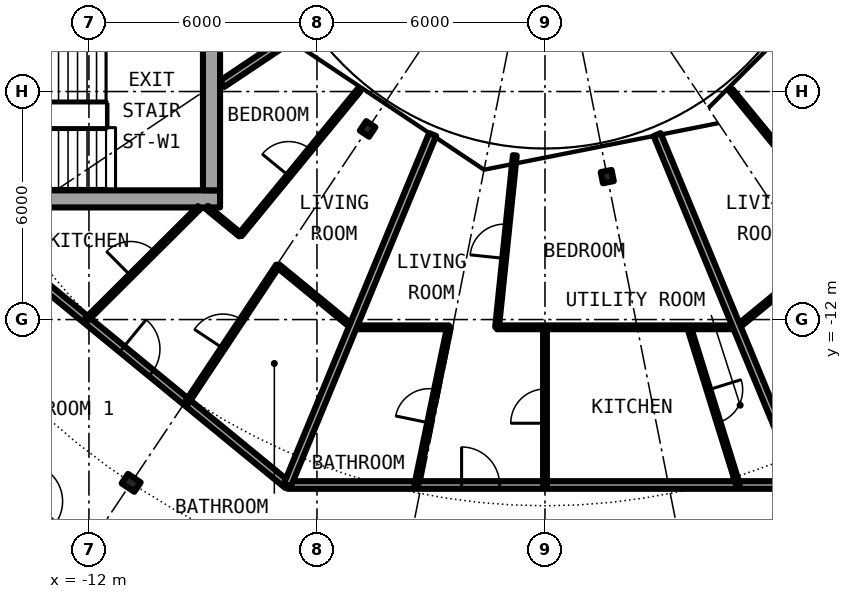
"""IFC4 building model, lengths in metres.
Left out: names, types, materials, properties, quantities, classifications, styles, units other than length and angle.
Written with IfcOpenShell. Run it as: python <this file> out.ifc"""

import sys

from ifc_helpers import new_model, si_unit, direction, frame, frame_2d, origin, origin_2d, place, context, subcontext, project, spatial, rectangle, i_section, extrude, element, fill, save


model = new_model("IFC4")
c1 = context("Model", 3, precision=1e-05, world=origin(), true_north=direction((0.0, 1.0)))
c2 = subcontext(c1, "Body", "Model", "MODEL_VIEW")
j1 = project(units=[si_unit("LENGTHUNIT", "METRE"), si_unit("PLANEANGLEUNIT", "RADIAN")], contexts=[c1])
p1 = place(None, origin())
s1 = spatial("IfcSite", under=j1, at=p1, CompositionType="ELEMENT")
p2 = place(p1, origin())
s2 = spatial("IfcBuilding", under=s1, at=p2, CompositionType="ELEMENT")
p3 = place(p2, frame((0.0, 0.0, 202.4)))
s3 = spatial("IfcBuildingStorey", under=s2, at=p3, CompositionType="ELEMENT", Elevation=202.4)
p4 = place(p3, frame((-10.889, -16.297, 0.0), z_axis=(0.0, 0.0, 1.0), x_axis=(-0.55557023302, -0.831469612303, 0.0)))
e1 = element("IfcColumn", 1, at=p4, inside=s3, PredefinedType="COLUMN", context=c2, shape_type="SweptSolid", body=[
    extrude(i_section(OverallWidth=0.3, OverallDepth=0.4, WebThickness=0.013, FlangeThickness=0.024, FilletRadius=0.027, at=origin_2d()), origin(), (0.0, 0.0, 1.0), 3.05),
])
for number, where, z_axis, x_axis in (
    (2, (-4.667, -6.984, 0.0), (0.0, 0.0, 1.0), (-0.556, -0.831, 0.0)),
    (3, (1.639, -8.239, 0.0), (0.0, 0.0, 1.0), (0.195, -0.981, 0.0)),
):
    element("IfcColumn", number, at=place(p3, frame(where, z_axis=z_axis, x_axis=x_axis)), inside=s3, PredefinedType="COLUMN", context=c2, shape_type="SweptSolid", body=[
        extrude(i_section(OverallWidth=0.3, OverallDepth=0.29, WebThickness=0.009, FlangeThickness=0.014, FilletRadius=0.027, at=origin_2d()), origin(), (0.0, 0.0, 1.0), 3.05),
    ])
p5 = place(p3, frame((-22.05, -8.825, 0.0), z_axis=(0.0, 0.0, 1.0), x_axis=(1.0, 0.0, 0.0)))
e4 = element("IfcWall", 4, at=p5, inside=s3, PredefinedType="SHEAR", context=c2, shape_type="SweptSolid", body=[
    extrude(rectangle(XDim=13.5, YDim=0.45, at=frame_2d((6.75, 0.0))), origin(), (0.0, 0.0, 1.0), 3.05),
])
p6 = place(p5, frame((0.975, 0.0, 0.0)))
e5 = element("IfcOpeningElement", 5, at=p6, cuts=e4, PredefinedType="OPENING", context=c2, shape_type="SweptSolid", body=[
    extrude(rectangle(XDim=1.2, YDim=2.3, at=frame_2d((0.6, 1.15))), frame((0.0, 0.235, 0.0), z_axis=(0.0, -1.0, 0.0), x_axis=(1.0, 0.0, 0.0)), (0.0, 0.0, 1.0), 0.47),
])
p7 = place(p3, frame((-8.775, 8.6, 0.0), z_axis=(0.0, 0.0, 1.0), x_axis=(0.0, -1.0, 0.0)))
e6 = element("IfcWall", 6, at=p7, inside=s3, PredefinedType="SHEAR", context=c2, shape_type="SweptSolid", body=[
    extrude(rectangle(XDim=17.2, YDim=0.45, at=frame_2d((8.6, 0.0))), origin(), (0.0, 0.0, 1.0), 3.05),
])
p8 = place(p7, frame((7.4, 0.0, 0.1)))
e7 = element("IfcOpeningElement", 7, at=p8, cuts=e6, PredefinedType="OPENING", context=c2, shape_type="SweptSolid", body=[
    extrude(rectangle(XDim=2.4, YDim=2.2, at=frame_2d((1.2, 1.1))), frame((0.0, 0.235, 0.0), z_axis=(0.0, -1.0, 0.0), x_axis=(1.0, 0.0, 0.0)), (0.0, 0.0, 1.0), 0.47),
])
p9 = place(p3, frame((-18.542, -12.389, 0.0), z_axis=(0.0, 0.0, 1.0), x_axis=(0.74093897184, -0.671572363941, 0.0)))
e8 = element("IfcWall", 8, at=p9, inside=s3, PredefinedType="PARTITIONING", context=c2, shape_type="SweptSolid", body=[
    extrude(rectangle(XDim=10.84, YDim=0.2, at=frame_2d((5.42, 0.0))), origin(), (0.0, 0.0, 1.0), 2.7),
])
p10 = place(p9, frame((6.544, 0.0, 0.0)))
e9 = element("IfcOpeningElement", 9, at=p10, cuts=e8, PredefinedType="OPENING", context=c2, shape_type="SweptSolid", body=[
    extrude(rectangle(XDim=1.0, YDim=2.3, at=frame_2d((0.5, 1.15))), frame((0.0, 0.11, 0.0), z_axis=(0.0, -1.0, 0.0), x_axis=(1.0, 0.0, 0.0)), (0.0, 0.0, 1.0), 0.22),
])
p11 = place(p3, frame((-14.717, -9.834, 0.0), z_axis=(0.0, 0.0, 1.0), x_axis=(0.773034536097, -0.634363938131, 0.0)))
e10 = element("IfcWall", 10, at=p11, inside=s3, PredefinedType="PARTITIONING", context=c2, shape_type="SweptSolid", body=[
    extrude(rectangle(XDim=10.277, YDim=0.2, at=frame_2d((5.138, 0.0))), origin(), (0.0, 0.0, 1.0), 2.7),
])
p12 = place(p11, frame((4.638, 0.0, 0.0)))
e11 = element("IfcOpeningElement", 11, at=p12, cuts=e10, PredefinedType="OPENING", context=c2, shape_type="SweptSolid", body=[
    extrude(rectangle(XDim=1.0, YDim=2.3, at=frame_2d((0.5, 1.15))), frame((0.0, 0.11, 0.0), z_axis=(0.0, -1.0, 0.0), x_axis=(1.0, 0.0, 0.0)), (0.0, 0.0, 1.0), 0.22),
])
p13 = place(p3, frame((-6.773, -16.353, 0.0), z_axis=(0.0, 0.0, 1.0), x_axis=(1.0, 0.0, 0.0)))
e12 = element("IfcWall", 12, at=p13, inside=s3, PredefinedType="PARTITIONING", context=c2, shape_type="SweptSolid", body=[
    extrude(rectangle(XDim=13.546, YDim=0.2, at=frame_2d((6.773, 0.0))), origin(), (0.0, 0.0, 1.0), 2.7),
])
p14 = place(p13, frame((4.579, 0.0, 0.0)))
e13 = element("IfcOpeningElement", 13, at=p14, cuts=e12, PredefinedType="OPENING", context=c2, shape_type="SweptSolid", body=[
    extrude(rectangle(XDim=1.0, YDim=2.3, at=frame_2d((0.5, 1.15))), frame((0.0, 0.11, 0.0), z_axis=(0.0, -1.0, 0.0), x_axis=(1.0, 0.0, 0.0)), (0.0, 0.0, 1.0), 0.22),
])
p15 = place(p3, frame((-8.901, -9.047, 0.0), z_axis=(0.0, 0.0, 1.0), x_axis=(0.772786083133, -0.634666581534, 0.0)))
e14 = element("IfcWall", 14, at=p15, inside=s3, PredefinedType="PARTITIONING", context=c2, shape_type="SweptSolid", body=[
    extrude(rectangle(XDim=1.144, YDim=0.1, at=frame_2d((0.572, 0.0))), origin(), (0.0, 0.0, 1.0), 2.7),
])
for number, where, z_axis, x_axis in (
    (15, (-7.031, -10.582, 0.0), (0.0, 0.0, 1.0), (0.773, -0.634, 0.0)),
    (16, (5.055, -12.204, 0.0), (0.0, 0.0, 1.0), (0.773, 0.634, 0.0)),
):
    element("IfcWall", number, at=place(p3, frame(where, z_axis=z_axis, x_axis=x_axis)), inside=s3, PredefinedType="PARTITIONING", context=c2, shape_type="SweptSolid", body=[
        extrude(rectangle(XDim=2.557, YDim=0.1, at=frame_2d((1.278, 0.0))), origin(), (0.0, 0.0, 1.0), 2.7),
    ])
p16 = place(p3, frame((-5.055, -12.204, 0.0), z_axis=(0.0, 0.0, 1.0), x_axis=(1.0, 0.0, 0.0)))
e17 = element("IfcWall", 17, at=p16, inside=s3, PredefinedType="PARTITIONING", context=c2, shape_type="SweptSolid", body=[
    extrude(rectangle(XDim=2.528, YDim=0.1, at=frame_2d((1.264, 0.0))), origin(), (0.0, 0.0, 1.0), 2.7),
])
p17 = place(p3, frame((-1.264, -12.204, 0.0), z_axis=(0.0, 0.0, 1.0), x_axis=(1.0, 0.0, 0.0)))
e18 = element("IfcWall", 18, at=p17, inside=s3, PredefinedType="PARTITIONING", context=c2, shape_type="SweptSolid", body=[
    extrude(rectangle(XDim=6.319, YDim=0.1, at=frame_2d((3.159, 0.0))), origin(), (0.0, 0.0, 1.0), 2.7),
])
p18 = place(p3, frame((-6.513, -4.472, 0.0), z_axis=(0.0, 0.0, 1.0), x_axis=(-0.831403409976, -0.555669299026, 0.0)))
e19 = element("IfcWall", 19, at=p18, inside=s3, PredefinedType="PARTITIONING", context=c2, shape_type="SweptSolid", body=[
    extrude(rectangle(XDim=2.383, YDim=0.2, at=frame_2d((1.191, 0.0))), origin(), (0.0, 0.0, 1.0), 2.7),
])
p19 = place(p3, frame((-12.069, -12.007, 0.0), z_axis=(0.0, 0.0, 1.0), x_axis=(0.708909651863, 0.705299302067, 0.0)))
e20 = element("IfcWall", 20, at=p19, inside=s3, PredefinedType="PARTITIONING", context=c2, shape_type="SweptSolid", body=[
    extrude(rectangle(XDim=4.193, YDim=0.1, at=frame_2d((2.096, 0.0))), origin(), (0.0, 0.0, 1.0), 2.7),
])
p20 = place(p19, frame((1.646, 0.0, 0.0)))
e21 = element("IfcOpeningElement", 21, at=p20, cuts=e20, PredefinedType="OPENING", context=c2, shape_type="SweptSolid", body=[
    extrude(rectangle(XDim=0.9, YDim=2.3, at=frame_2d((0.45, 1.15))), frame((0.0, 0.06, 0.0), z_axis=(0.0, -1.0, 0.0), x_axis=(1.0, 0.0, 0.0)), (0.0, 0.0, 1.0), 0.12),
])
p21 = place(p3, frame((-9.421, -14.18, 0.0), z_axis=(0.0, 0.0, 1.0), x_axis=(0.553303732327, 0.832979579457, 0.0)))
e22 = element("IfcWall", 22, at=p21, inside=s3, PredefinedType="PARTITIONING", context=c2, shape_type="SweptSolid", body=[
    extrude(rectangle(XDim=4.319, YDim=0.1, at=frame_2d((2.16, 0.0))), origin(), (0.0, 0.0, 1.0), 2.7),
])
p22 = place(p21, frame((1.71, 0.0, 0.0)))
e23 = element("IfcOpeningElement", 23, at=p22, cuts=e22, PredefinedType="OPENING", context=c2, shape_type="SweptSolid", body=[
    extrude(rectangle(XDim=0.9, YDim=2.3, at=frame_2d((0.45, 1.15))), frame((0.0, 0.06, 0.0), z_axis=(0.0, -1.0, 0.0), x_axis=(1.0, 0.0, 0.0)), (0.0, 0.0, 1.0), 0.12),
])
p23 = place(p3, frame((-8.019, -9.771, 0.0), z_axis=(0.0, 0.0, 1.0), x_axis=(0.634401778971, 0.773003481776, 0.0)))
e24 = element("IfcWall", 24, at=p23, inside=s3, PredefinedType="PARTITIONING", context=c2, shape_type="SweptSolid", body=[
    extrude(rectangle(XDim=4.92, YDim=0.1, at=frame_2d((2.46, 0.0))), origin(), (0.0, 0.0, 1.0), 2.7),
])
p24 = place(p23, frame((2.01, 0.0, 0.0)))
e25 = element("IfcOpeningElement", 25, at=p24, cuts=e24, PredefinedType="OPENING", context=c2, shape_type="SweptSolid", body=[
    extrude(rectangle(XDim=0.9, YDim=2.3, at=frame_2d((0.45, 1.15))), frame((0.0, 0.06, 0.0), z_axis=(0.0, -1.0, 0.0), x_axis=(1.0, 0.0, 0.0)), (0.0, 0.0, 1.0), 0.12),
])
p25 = place(p3, frame((-6.778, -16.351, 0.0), z_axis=(0.0, 0.0, 1.0), x_axis=(0.382938658032, 0.923773773272, 0.0)))
e26 = element("IfcWall", 26, at=p25, inside=s3, PredefinedType="PARTITIONING", context=c2, shape_type="SweptSolid", body=[
    extrude(rectangle(XDim=9.981, YDim=0.2, at=frame_2d((4.99, 0.0))), origin(), (0.0, 0.0, 1.0), 2.7),
])
p26 = place(p3, frame((-3.387, -16.353, 0.0), z_axis=(0.0, 0.0, 1.0), x_axis=(0.202937120105, 0.979191771454, 0.0)))
e27 = element("IfcWall", 27, at=p26, inside=s3, PredefinedType="PARTITIONING", context=c2, shape_type="SweptSolid", body=[
    extrude(rectangle(XDim=4.237, YDim=0.1, at=frame_2d((2.119, 0.0))), origin(), (0.0, 0.0, 1.0), 2.7),
])
p27 = place(p26, frame((1.669, 0.0, 0.0)))
e28 = element("IfcOpeningElement", 28, at=p27, cuts=e27, PredefinedType="OPENING", context=c2, shape_type="SweptSolid", body=[
    extrude(rectangle(XDim=0.9, YDim=2.3, at=frame_2d((0.45, 1.15))), frame((0.0, 0.06, 0.0), z_axis=(0.0, -1.0, 0.0), x_axis=(1.0, 0.0, 0.0)), (0.0, 0.0, 1.0), 0.12),
])
p28 = place(p3, frame((-1.261, -12.204, 0.0), z_axis=(0.0, 0.0, 1.0), x_axis=(0.102877179684, 0.994694066485, 0.0)))
e29 = element("IfcWall", 29, at=p28, inside=s3, PredefinedType="PARTITIONING", context=c2, shape_type="SweptSolid", body=[
    extrude(rectangle(XDim=4.549, YDim=0.1, at=frame_2d((2.275, 0.0))), origin(), (0.0, 0.0, 1.0), 2.7),
])
p29 = place(p28, frame((1.824, 0.0, 0.0)))
e30 = element("IfcOpeningElement", 30, at=p29, cuts=e29, PredefinedType="OPENING", context=c2, shape_type="SweptSolid", body=[
    extrude(rectangle(XDim=0.9, YDim=2.3, at=frame_2d((0.45, 1.15))), frame((0.0, 0.06, 0.0), z_axis=(0.0, -1.0, 0.0), x_axis=(1.0, 0.0, 0.0)), (0.0, 0.0, 1.0), 0.12),
])
p30 = place(p3, frame((0.0, -16.353, 0.0), z_axis=(0.0, 0.0, 1.0), x_axis=(0.0, 1.0, 0.0)))
e31 = element("IfcWall", 31, at=p30, inside=s3, PredefinedType="PARTITIONING", context=c2, shape_type="SweptSolid", body=[
    extrude(rectangle(XDim=4.149, YDim=0.1, at=frame_2d((2.074, 0.0))), origin(), (0.0, 0.0, 1.0), 2.7),
])
p31 = place(p30, frame((1.625, 0.0, 0.0)))
e32 = element("IfcOpeningElement", 32, at=p31, cuts=e31, PredefinedType="OPENING", context=c2, shape_type="SweptSolid", body=[
    extrude(rectangle(XDim=0.9, YDim=2.3, at=frame_2d((0.45, 1.15))), frame((0.0, 0.06, 0.0), z_axis=(0.0, -1.0, 0.0), x_axis=(1.0, 0.0, 0.0)), (0.0, 0.0, 1.0), 0.12),
])
p32 = place(p3, frame((2.952, -7.133, 0.0), z_axis=(0.0, 0.0, 1.0), x_axis=(0.382570007985, -0.923926506271, 0.0)))
e33 = element("IfcWall", 33, at=p32, inside=s3, PredefinedType="PARTITIONING", context=c2, shape_type="SweptSolid", body=[
    extrude(rectangle(XDim=9.98, YDim=0.2, at=frame_2d((4.99, 0.0))), origin(), (0.0, 0.0, 1.0), 2.7),
])
p33 = place(p3, frame((3.791, -12.204, 0.0), z_axis=(0.0, 0.0, 1.0), x_axis=(0.29670674532, -0.954968642041, 0.0)))
e34 = element("IfcWall", 34, at=p33, inside=s3, PredefinedType="PARTITIONING", context=c2, shape_type="SweptSolid", body=[
    extrude(rectangle(XDim=4.344, YDim=0.1, at=frame_2d((2.172, 0.0))), origin(), (0.0, 0.0, 1.0), 2.7),
])
p34 = place(p33, frame((1.722, 0.0, 0.0)))
e35 = element("IfcOpeningElement", 35, at=p34, cuts=e34, PredefinedType="OPENING", context=c2, shape_type="SweptSolid", body=[
    extrude(rectangle(XDim=0.9, YDim=2.3, at=frame_2d((0.45, 1.15))), frame((0.0, 0.06, 0.0), z_axis=(0.0, -1.0, 0.0), x_axis=(1.0, 0.0, 0.0)), (0.0, 0.0, 1.0), 0.12),
])
p35 = place(p3, frame((4.898, -5.968, 0.0), z_axis=(0.0, 0.0, 1.0), x_axis=(0.634401778971, -0.773003481776, 0.0)))
e36 = element("IfcWall", 36, at=p35, inside=s3, PredefinedType="PARTITIONING", context=c2, shape_type="SweptSolid", body=[
    extrude(rectangle(XDim=4.92, YDim=0.1, at=frame_2d((2.46, 0.0))), origin(), (0.0, 0.0, 1.0), 2.7),
])
p36 = place(p35, frame((2.01, 0.0, 0.0)))
e37 = element("IfcOpeningElement", 37, at=p36, cuts=e36, PredefinedType="OPENING", context=c2, shape_type="SweptSolid", body=[
    extrude(rectangle(XDim=0.9, YDim=2.3, at=frame_2d((0.45, 1.15))), frame((0.0, 0.06, 0.0), z_axis=(0.0, -1.0, 0.0), x_axis=(1.0, 0.0, 0.0)), (0.0, 0.0, 1.0), 0.12),
])
p37 = place(p10, origin())
e38 = element("IfcDoor", 38, at=p37, inside=s3, OperationType="SINGLE_SWING_RIGHT", PredefinedType="DOOR", context=c2, shape_type="SweptSolid", body=[
    extrude(rectangle(XDim=1.0, YDim=2.3, at=frame_2d((0.5, 1.15))), frame((0.0, 0.025, 0.0), z_axis=(0.0, -1.0, 0.0), x_axis=(1.0, 0.0, 0.0)), (0.0, 0.0, 1.0), 0.05),
])
fill(e9, e38)
p38 = place(p12, origin())
e39 = element("IfcDoor", 39, at=p38, inside=s3, OperationType="SINGLE_SWING_LEFT", PredefinedType="DOOR", context=c2, shape_type="SweptSolid", body=[
    extrude(rectangle(XDim=1.0, YDim=2.3, at=frame_2d((0.5, 1.15))), frame((0.0, 0.025, 0.0), z_axis=(0.0, -1.0, 0.0), x_axis=(1.0, 0.0, 0.0)), (0.0, 0.0, 1.0), 0.05),
])
fill(e11, e39)
p39 = place(p22, origin())
e40 = element("IfcDoor", 40, at=p39, inside=s3, OperationType="SINGLE_SWING_RIGHT", PredefinedType="DOOR", context=c2, shape_type="SweptSolid", body=[
    extrude(rectangle(XDim=0.9, YDim=2.3, at=frame_2d((0.45, 1.15))), frame((0.0, 0.025, 0.0), z_axis=(0.0, -1.0, 0.0), x_axis=(1.0, 0.0, 0.0)), (0.0, 0.0, 1.0), 0.05),
])
fill(e23, e40)
p40 = place(p20, origin())
e41 = element("IfcDoor", 41, at=p40, inside=s3, OperationType="SINGLE_SWING_LEFT", PredefinedType="DOOR", context=c2, shape_type="SweptSolid", body=[
    extrude(rectangle(XDim=0.9, YDim=2.3, at=frame_2d((0.45, 1.15))), frame((0.0, 0.025, 0.0), z_axis=(0.0, -1.0, 0.0), x_axis=(1.0, 0.0, 0.0)), (0.0, 0.0, 1.0), 0.05),
])
fill(e21, e41)
p41 = place(p24, origin())
e42 = element("IfcDoor", 42, at=p41, inside=s3, OperationType="SINGLE_SWING_LEFT", PredefinedType="DOOR", context=c2, shape_type="SweptSolid", body=[
    extrude(rectangle(XDim=0.9, YDim=2.3, at=frame_2d((0.45, 1.15))), frame((0.0, 0.025, 0.0), z_axis=(0.0, -1.0, 0.0), x_axis=(1.0, 0.0, 0.0)), (0.0, 0.0, 1.0), 0.05),
])
fill(e25, e42)
p42 = place(p14, origin())
e43 = element("IfcDoor", 43, at=p42, inside=s3, OperationType="SINGLE_SWING_LEFT", PredefinedType="DOOR", context=c2, shape_type="SweptSolid", body=[
    extrude(rectangle(XDim=1.0, YDim=2.3, at=frame_2d((0.5, 1.15))), frame((0.0, 0.025, 0.0), z_axis=(0.0, -1.0, 0.0), x_axis=(1.0, 0.0, 0.0)), (0.0, 0.0, 1.0), 0.05),
])
fill(e13, e43)
p43 = place(p27, origin())
e44 = element("IfcDoor", 44, at=p43, inside=s3, OperationType="SINGLE_SWING_LEFT", PredefinedType="DOOR", context=c2, shape_type="SweptSolid", body=[
    extrude(rectangle(XDim=0.9, YDim=2.3, at=frame_2d((0.45, 1.15))), frame((0.0, 0.025, 0.0), z_axis=(0.0, -1.0, 0.0), x_axis=(1.0, 0.0, 0.0)), (0.0, 0.0, 1.0), 0.05),
])
fill(e28, e44)
p44 = place(p31, origin())
e45 = element("IfcDoor", 45, at=p44, inside=s3, OperationType="SINGLE_SWING_RIGHT", PredefinedType="DOOR", context=c2, shape_type="SweptSolid", body=[
    extrude(rectangle(XDim=0.9, YDim=2.3, at=frame_2d((0.45, 1.15))), frame((0.0, 0.025, 0.0), z_axis=(0.0, -1.0, 0.0), x_axis=(1.0, 0.0, 0.0)), (0.0, 0.0, 1.0), 0.05),
])
fill(e32, e45)
p45 = place(p34, origin())
e46 = element("IfcDoor", 46, at=p45, inside=s3, OperationType="SINGLE_SWING_RIGHT", PredefinedType="DOOR", context=c2, shape_type="SweptSolid", body=[
    extrude(rectangle(XDim=0.9, YDim=2.3, at=frame_2d((0.45, 1.15))), frame((0.0, 0.025, 0.0), z_axis=(0.0, -1.0, 0.0), x_axis=(1.0, 0.0, 0.0)), (0.0, 0.0, 1.0), 0.05),
])
fill(e35, e46)
p46 = place(p29, origin())
e47 = element("IfcDoor", 47, at=p46, inside=s3, OperationType="SINGLE_SWING_LEFT", PredefinedType="DOOR", context=c2, shape_type="SweptSolid", body=[
    extrude(rectangle(XDim=0.9, YDim=2.3, at=frame_2d((0.45, 1.15))), frame((0.0, 0.025, 0.0), z_axis=(0.0, -1.0, 0.0), x_axis=(1.0, 0.0, 0.0)), (0.0, 0.0, 1.0), 0.05),
])
fill(e30, e47)
save(model, sys.argv[1])
